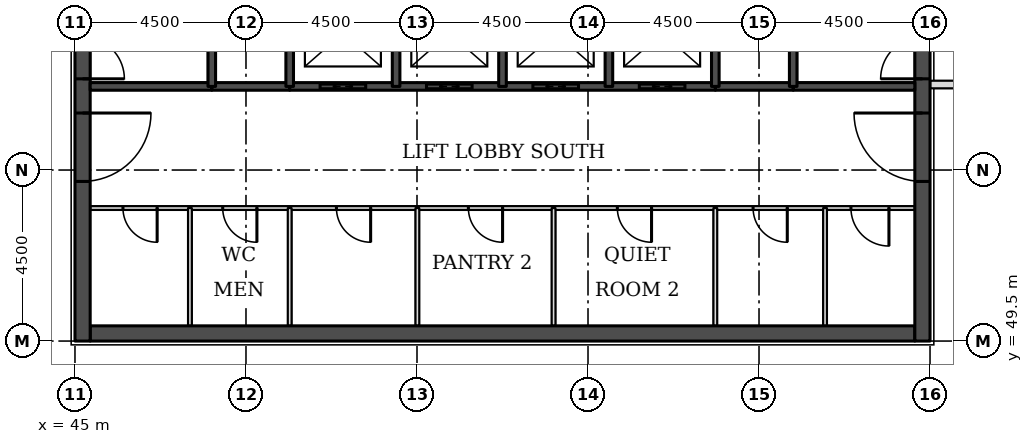
"""IFC4 building model, lengths in metres.
Left out: names, types, materials, properties, quantities, classifications, styles, units other than length and angle.
Written with IfcOpenShell. Run it as: python <this file> out.ifc"""

import sys

from ifc_helpers import new_model, si_unit, direction, frame, frame_2d, origin, place, context, subcontext, project, spatial, rectangle, extrude, element, fill, save


model = new_model("IFC4")
c1 = context("Model", 3, precision=1e-05, world=origin(), true_north=direction((0.0, 1.0)))
c2 = subcontext(c1, "Body", "Model", "MODEL_VIEW")
j1 = project(units=[si_unit("LENGTHUNIT", "METRE"), si_unit("PLANEANGLEUNIT", "RADIAN")], contexts=[c1])
p1 = place(None, origin())
s1 = spatial("IfcSite", under=j1, at=p1, CompositionType="ELEMENT")
p2 = place(p1, origin())
s2 = spatial("IfcBuilding", under=s1, at=p2, CompositionType="ELEMENT")
p3 = place(p2, frame((0.0, 0.0, 206.9)))
s3 = spatial("IfcBuildingStorey", under=s2, at=p3, CompositionType="ELEMENT", Elevation=206.9)
p4 = place(p3, frame((45.4, 49.7, 0.0), z_axis=(0.0, 0.0, 1.0), x_axis=(1.0, 0.0, 0.0)))
e1 = element("IfcWall", 1, at=p4, inside=s3, PredefinedType="SHEAR", context=c2, shape_type="SweptSolid", body=[
    extrude(rectangle(XDim=21.7, YDim=0.4, at=frame_2d((10.85, 0.0))), origin(), (0.0, 0.0, 1.0), 5.0),
])
p5 = place(p3, frame((45.2, 49.5, 0.0), z_axis=(0.0, 0.0, 1.0), x_axis=(0.0, 1.0, 0.0)))
e2 = element("IfcWall", 2, at=p5, inside=s3, PredefinedType="SHEAR", context=c2, shape_type="SweptSolid", body=[
    extrude(rectangle(XDim=22.5, YDim=0.4, at=frame_2d((11.25, 0.0))), origin(), (0.0, 0.0, 1.0), 5.0),
])
p6 = place(p5, frame((4.2, 0.0, 0.0)))
e3 = element("IfcOpeningElement", 3, at=p6, cuts=e2, PredefinedType="OPENING", context=c2, shape_type="SweptSolid", body=[
    extrude(rectangle(XDim=1.8, YDim=2.1, at=frame_2d((0.9, 1.05))), frame((0.0, 0.21, 0.0), z_axis=(0.0, -1.0, 0.0), x_axis=(1.0, 0.0, 0.0)), (0.0, 0.0, 1.0), 0.42),
])
p7 = place(p5, frame((6.9, 0.0, 0.0)))
e4 = element("IfcOpeningElement", 4, at=p7, cuts=e2, PredefinedType="OPENING", context=c2, shape_type="SweptSolid", body=[
    extrude(rectangle(XDim=1.1, YDim=2.1, at=frame_2d((0.55, 1.05))), frame((0.0, 0.21, 0.0), z_axis=(0.0, -1.0, 0.0), x_axis=(1.0, 0.0, 0.0)), (0.0, 0.0, 1.0), 0.42),
])
p8 = place(p5, frame((13.6, 0.0, 0.0)))
e5 = element("IfcOpeningElement", 5, at=p8, cuts=e2, PredefinedType="OPENING", context=c2, shape_type="SweptSolid", body=[
    extrude(rectangle(XDim=1.1, YDim=2.1, at=frame_2d((0.55, 1.05))), frame((0.0, 0.21, 0.0), z_axis=(0.0, -1.0, 0.0), x_axis=(1.0, 0.0, 0.0)), (0.0, 0.0, 1.0), 0.42),
])
p9 = place(p5, frame((16.5, 0.0, 0.0)))
e6 = element("IfcOpeningElement", 6, at=p9, cuts=e2, PredefinedType="OPENING", context=c2, shape_type="SweptSolid", body=[
    extrude(rectangle(XDim=1.8, YDim=2.1, at=frame_2d((0.9, 1.05))), frame((0.0, 0.21, 0.0), z_axis=(0.0, -1.0, 0.0), x_axis=(1.0, 0.0, 0.0)), (0.0, 0.0, 1.0), 0.42),
])
p10 = place(p3, frame((67.3, 49.5, 0.0), z_axis=(0.0, 0.0, 1.0), x_axis=(0.0, 1.0, 0.0)))
e7 = element("IfcWall", 7, at=p10, inside=s3, PredefinedType="SHEAR", context=c2, shape_type="SweptSolid", body=[
    extrude(rectangle(XDim=22.5, YDim=0.4, at=frame_2d((11.25, 0.0))), origin(), (0.0, 0.0, 1.0), 5.0),
])
p11 = place(p10, frame((4.2, 0.0, 0.0)))
e8 = element("IfcOpeningElement", 8, at=p11, cuts=e7, PredefinedType="OPENING", context=c2, shape_type="SweptSolid", body=[
    extrude(rectangle(XDim=1.8, YDim=2.1, at=frame_2d((0.9, 1.05))), frame((0.0, 0.21, 0.0), z_axis=(0.0, -1.0, 0.0), x_axis=(1.0, 0.0, 0.0)), (0.0, 0.0, 1.0), 0.42),
])
p12 = place(p10, frame((6.9, 0.0, 0.0)))
e9 = element("IfcOpeningElement", 9, at=p12, cuts=e7, PredefinedType="OPENING", context=c2, shape_type="SweptSolid", body=[
    extrude(rectangle(XDim=1.1, YDim=2.1, at=frame_2d((0.55, 1.05))), frame((0.0, 0.21, 0.0), z_axis=(0.0, -1.0, 0.0), x_axis=(1.0, 0.0, 0.0)), (0.0, 0.0, 1.0), 0.42),
])
p13 = place(p10, frame((13.6, 0.0, 0.0)))
e10 = element("IfcOpeningElement", 10, at=p13, cuts=e7, PredefinedType="OPENING", context=c2, shape_type="SweptSolid", body=[
    extrude(rectangle(XDim=1.1, YDim=2.1, at=frame_2d((0.55, 1.05))), frame((0.0, 0.21, 0.0), z_axis=(0.0, -1.0, 0.0), x_axis=(1.0, 0.0, 0.0)), (0.0, 0.0, 1.0), 0.42),
])
p14 = place(p10, frame((16.5, 0.0, 0.0)))
e11 = element("IfcOpeningElement", 11, at=p14, cuts=e7, PredefinedType="OPENING", context=c2, shape_type="SweptSolid", body=[
    extrude(rectangle(XDim=1.8, YDim=2.1, at=frame_2d((0.9, 1.05))), frame((0.0, 0.21, 0.0), z_axis=(0.0, -1.0, 0.0), x_axis=(1.0, 0.0, 0.0)), (0.0, 0.0, 1.0), 0.42),
])
p15 = place(p3, frame((67.5, 56.25, 0.0), z_axis=(0.0, 0.0, 1.0), x_axis=(1.0, 0.0, 0.0)))
e12 = element("IfcWall", 12, at=p15, inside=s3, PredefinedType="PARTITIONING", context=c2, shape_type="SweptSolid", body=[
    extrude(rectangle(XDim=2.0, YDim=0.2, at=frame_2d((1.0, 0.0))), origin(), (0.0, 0.0, 1.0), 4.85),
])
p16 = place(p3, frame((45.4, 53.0, 0.0), z_axis=(0.0, 0.0, 1.0), x_axis=(1.0, 0.0, 0.0)))
e13 = element("IfcWall", 13, at=p16, inside=s3, PredefinedType="PARTITIONING", context=c2, shape_type="SweptSolid", body=[
    extrude(rectangle(XDim=21.7, YDim=0.1, at=frame_2d((10.85, 0.0))), origin(), (0.0, 0.0, 1.0), 4.85),
])
p17 = place(p16, frame((20.019, 0.0, 0.0)))
e14 = element("IfcOpeningElement", 14, at=p17, cuts=e13, PredefinedType="OPENING", context=c2, shape_type="SweptSolid", body=[
    extrude(rectangle(XDim=1.0, YDim=2.1, at=frame_2d((0.5, 1.05))), frame((0.0, 0.06, 0.0), z_axis=(0.0, -1.0, 0.0), x_axis=(1.0, 0.0, 0.0)), (0.0, 0.0, 1.0), 0.12),
])
p18 = place(p16, frame((17.444, 0.0, 0.0)))
e15 = element("IfcOpeningElement", 15, at=p18, cuts=e13, PredefinedType="OPENING", context=c2, shape_type="SweptSolid", body=[
    extrude(rectangle(XDim=0.9, YDim=2.1, at=frame_2d((0.45, 1.05))), frame((0.0, 0.06, 0.0), z_axis=(0.0, -1.0, 0.0), x_axis=(1.0, 0.0, 0.0)), (0.0, 0.0, 1.0), 0.12),
])
p19 = place(p16, frame((0.863, 0.0, 0.0)))
e16 = element("IfcOpeningElement", 16, at=p19, cuts=e13, PredefinedType="OPENING", context=c2, shape_type="SweptSolid", body=[
    extrude(rectangle(XDim=0.9, YDim=2.1, at=frame_2d((0.45, 1.05))), frame((0.0, 0.06, 0.0), z_axis=(0.0, -1.0, 0.0), x_axis=(1.0, 0.0, 0.0)), (0.0, 0.0, 1.0), 0.12),
])
p20 = place(p16, frame((3.488, 0.0, 0.0)))
e17 = element("IfcOpeningElement", 17, at=p20, cuts=e13, PredefinedType="OPENING", context=c2, shape_type="SweptSolid", body=[
    extrude(rectangle(XDim=0.9, YDim=2.1, at=frame_2d((0.45, 1.05))), frame((0.0, 0.06, 0.0), z_axis=(0.0, -1.0, 0.0), x_axis=(1.0, 0.0, 0.0)), (0.0, 0.0, 1.0), 0.12),
])
p21 = place(p16, frame((6.48, 0.0, 0.0)))
e18 = element("IfcOpeningElement", 18, at=p21, cuts=e13, PredefinedType="OPENING", context=c2, shape_type="SweptSolid", body=[
    extrude(rectangle(XDim=0.9, YDim=2.1, at=frame_2d((0.45, 1.05))), frame((0.0, 0.06, 0.0), z_axis=(0.0, -1.0, 0.0), x_axis=(1.0, 0.0, 0.0)), (0.0, 0.0, 1.0), 0.12),
])
p22 = place(p16, frame((9.952, 0.0, 0.0)))
e19 = element("IfcOpeningElement", 19, at=p22, cuts=e13, PredefinedType="OPENING", context=c2, shape_type="SweptSolid", body=[
    extrude(rectangle(XDim=0.9, YDim=2.1, at=frame_2d((0.45, 1.05))), frame((0.0, 0.06, 0.0), z_axis=(0.0, -1.0, 0.0), x_axis=(1.0, 0.0, 0.0)), (0.0, 0.0, 1.0), 0.12),
])
p23 = place(p16, frame((13.872, 0.0, 0.0)))
e20 = element("IfcOpeningElement", 20, at=p23, cuts=e13, PredefinedType="OPENING", context=c2, shape_type="SweptSolid", body=[
    extrude(rectangle(XDim=0.9, YDim=2.1, at=frame_2d((0.45, 1.05))), frame((0.0, 0.06, 0.0), z_axis=(0.0, -1.0, 0.0), x_axis=(1.0, 0.0, 0.0)), (0.0, 0.0, 1.0), 0.12),
])
for number, where, z_axis, x_axis in (
    (21, (48.6, 56.2, 0.0), (0.0, 0.0, 1.0), (1.0, 0.0, 0.0)),
    (22, (61.85, 56.2, 0.0), (0.0, 0.0, 1.0), (1.0, 0.0, 0.0)),
):
    element("IfcWall", number, at=place(p3, frame(where, z_axis=z_axis, x_axis=x_axis)), inside=s3, PredefinedType="SOLIDWALL", context=c2, shape_type="SweptSolid", body=[
        extrude(rectangle(XDim=2.05, YDim=0.2, at=frame_2d((1.025, 0.0))), origin(), (0.0, 0.0, 1.0), 4.85),
    ])
p24 = place(p3, frame((45.4, 56.2, 0.0), z_axis=(0.0, 0.0, 1.0), x_axis=(1.0, 0.0, 0.0)))
e23 = element("IfcWall", 23, at=p24, inside=s3, PredefinedType="SOLIDWALL", context=c2, shape_type="SweptSolid", body=[
    extrude(rectangle(XDim=3.2, YDim=0.2, at=frame_2d((1.6, 0.0))), origin(), (0.0, 0.0, 1.0), 4.85),
])
p25 = place(p3, frame((50.65, 56.2, 0.0), z_axis=(0.0, 0.0, 1.0), x_axis=(1.0, 0.0, 0.0)))
e24 = element("IfcWall", 24, at=p25, inside=s3, PredefinedType="SOLIDWALL", context=c2, shape_type="SweptSolid", body=[
    extrude(rectangle(XDim=11.2, YDim=0.2, at=frame_2d((5.6, 0.0))), origin(), (0.0, 0.0, 1.0), 4.85),
])
p26 = place(p25, frame((0.8, 0.0, 0.0)))
e25 = element("IfcOpeningElement", 25, at=p26, cuts=e24, PredefinedType="OPENING", context=c2, shape_type="SweptSolid", body=[
    extrude(rectangle(XDim=1.2, YDim=2.1, at=frame_2d((0.6, 1.05))), frame((0.0, 0.11, 0.0), z_axis=(0.0, -1.0, 0.0), x_axis=(1.0, 0.0, 0.0)), (0.0, 0.0, 1.0), 0.22),
])
p27 = place(p25, frame((3.6, 0.0, 0.0)))
e26 = element("IfcOpeningElement", 26, at=p27, cuts=e24, PredefinedType="OPENING", context=c2, shape_type="SweptSolid", body=[
    extrude(rectangle(XDim=1.2, YDim=2.1, at=frame_2d((0.6, 1.05))), frame((0.0, 0.11, 0.0), z_axis=(0.0, -1.0, 0.0), x_axis=(1.0, 0.0, 0.0)), (0.0, 0.0, 1.0), 0.22),
])
p28 = place(p25, frame((6.4, 0.0, 0.0)))
e27 = element("IfcOpeningElement", 27, at=p28, cuts=e24, PredefinedType="OPENING", context=c2, shape_type="SweptSolid", body=[
    extrude(rectangle(XDim=1.2, YDim=2.1, at=frame_2d((0.6, 1.05))), frame((0.0, 0.11, 0.0), z_axis=(0.0, -1.0, 0.0), x_axis=(1.0, 0.0, 0.0)), (0.0, 0.0, 1.0), 0.22),
])
p29 = place(p25, frame((9.2, 0.0, 0.0)))
e28 = element("IfcOpeningElement", 28, at=p29, cuts=e24, PredefinedType="OPENING", context=c2, shape_type="SweptSolid", body=[
    extrude(rectangle(XDim=1.2, YDim=2.1, at=frame_2d((0.6, 1.05))), frame((0.0, 0.11, 0.0), z_axis=(0.0, -1.0, 0.0), x_axis=(1.0, 0.0, 0.0)), (0.0, 0.0, 1.0), 0.22),
])
p30 = place(p3, frame((63.9, 56.2, 0.0), z_axis=(0.0, 0.0, 1.0), x_axis=(1.0, 0.0, 0.0)))
e29 = element("IfcWall", 29, at=p30, inside=s3, PredefinedType="SOLIDWALL", context=c2, shape_type="SweptSolid", body=[
    extrude(rectangle(XDim=3.2, YDim=0.2, at=frame_2d((1.6, 0.0))), origin(), (0.0, 0.0, 1.0), 4.85),
])
p31 = place(p3, frame((48.025, 49.9, 0.0), z_axis=(0.0, 0.0, 1.0), x_axis=(0.0, 1.0, 0.0)))
e30 = element("IfcWall", 30, at=p31, inside=s3, PredefinedType="PARTITIONING", context=c2, shape_type="SweptSolid", body=[
    extrude(rectangle(XDim=3.1, YDim=0.1, at=frame_2d((1.55, 0.0))), origin(), (0.0, 0.0, 1.0), 4.85),
])
p32 = place(p3, frame((48.6, 56.2, 0.0), z_axis=(0.0, 0.0, 1.0), x_axis=(0.0, 1.0, 0.0)))
e31 = element("IfcWall", 31, at=p32, inside=s3, PredefinedType="SOLIDWALL", context=c2, shape_type="SweptSolid", body=[
    extrude(rectangle(XDim=5.8, YDim=0.2, at=frame_2d((2.9, 0.0))), origin(), (0.0, 0.0, 1.0), 4.85),
])
p33 = place(p3, frame((50.65, 49.9, 0.0), z_axis=(0.0, 0.0, 1.0), x_axis=(0.0, 1.0, 0.0)))
e32 = element("IfcWall", 32, at=p33, inside=s3, PredefinedType="PARTITIONING", context=c2, shape_type="SweptSolid", body=[
    extrude(rectangle(XDim=3.1, YDim=0.1, at=frame_2d((1.55, 0.0))), origin(), (0.0, 0.0, 1.0), 4.85),
])
for number, where, z_axis, x_axis in (
    (33, (50.65, 56.2, 0.0), (0.0, 0.0, 1.0), (0.0, 1.0, 0.0)),
    (34, (53.45, 56.2, 0.0), (0.0, 0.0, 1.0), (0.0, 1.0, 0.0)),
):
    element("IfcWall", number, at=place(p3, frame(where, z_axis=z_axis, x_axis=x_axis)), inside=s3, PredefinedType="SOLIDWALL", context=c2, shape_type="SweptSolid", body=[
        extrude(rectangle(XDim=2.8, YDim=0.2, at=frame_2d((1.4, 0.0))), origin(), (0.0, 0.0, 1.0), 4.85),
    ])
p34 = place(p3, frame((54.01, 49.9, 0.0), z_axis=(0.0, 0.0, 1.0), x_axis=(0.0, 1.0, 0.0)))
e35 = element("IfcWall", 35, at=p34, inside=s3, PredefinedType="PARTITIONING", context=c2, shape_type="SweptSolid", body=[
    extrude(rectangle(XDim=3.1, YDim=0.1, at=frame_2d((1.55, 0.0))), origin(), (0.0, 0.0, 1.0), 4.85),
])
p35 = place(p3, frame((56.25, 56.2, 0.0), z_axis=(0.0, 0.0, 1.0), x_axis=(0.0, 1.0, 0.0)))
e36 = element("IfcWall", 36, at=p35, inside=s3, PredefinedType="SOLIDWALL", context=c2, shape_type="SweptSolid", body=[
    extrude(rectangle(XDim=2.8, YDim=0.2, at=frame_2d((1.4, 0.0))), origin(), (0.0, 0.0, 1.0), 4.85),
])
p36 = place(p3, frame((57.594, 49.9, 0.0), z_axis=(0.0, 0.0, 1.0), x_axis=(0.0, 1.0, 0.0)))
e37 = element("IfcWall", 37, at=p36, inside=s3, PredefinedType="PARTITIONING", context=c2, shape_type="SweptSolid", body=[
    extrude(rectangle(XDim=3.1, YDim=0.1, at=frame_2d((1.55, 0.0))), origin(), (0.0, 0.0, 1.0), 4.85),
])
p37 = place(p3, frame((59.05, 56.2, 0.0), z_axis=(0.0, 0.0, 1.0), x_axis=(0.0, 1.0, 0.0)))
e38 = element("IfcWall", 38, at=p37, inside=s3, PredefinedType="SOLIDWALL", context=c2, shape_type="SweptSolid", body=[
    extrude(rectangle(XDim=2.8, YDim=0.2, at=frame_2d((1.4, 0.0))), origin(), (0.0, 0.0, 1.0), 4.85),
])
p38 = place(p3, frame((61.85, 49.9, 0.0), z_axis=(0.0, 0.0, 1.0), x_axis=(0.0, 1.0, 0.0)))
e39 = element("IfcWall", 39, at=p38, inside=s3, PredefinedType="PARTITIONING", context=c2, shape_type="SweptSolid", body=[
    extrude(rectangle(XDim=3.1, YDim=0.1, at=frame_2d((1.55, 0.0))), origin(), (0.0, 0.0, 1.0), 4.85),
])
p39 = place(p3, frame((61.85, 56.2, 0.0), z_axis=(0.0, 0.0, 1.0), x_axis=(0.0, 1.0, 0.0)))
e40 = element("IfcWall", 40, at=p39, inside=s3, PredefinedType="SOLIDWALL", context=c2, shape_type="SweptSolid", body=[
    extrude(rectangle(XDim=2.8, YDim=0.2, at=frame_2d((1.4, 0.0))), origin(), (0.0, 0.0, 1.0), 4.85),
])
p40 = place(p3, frame((63.9, 56.2, 0.0), z_axis=(0.0, 0.0, 1.0), x_axis=(0.0, 1.0, 0.0)))
e41 = element("IfcWall", 41, at=p40, inside=s3, PredefinedType="SOLIDWALL", context=c2, shape_type="SweptSolid", body=[
    extrude(rectangle(XDim=5.8, YDim=0.2, at=frame_2d((2.9, 0.0))), origin(), (0.0, 0.0, 1.0), 4.85),
])
p41 = place(p3, frame((64.738, 49.9, 0.0), z_axis=(0.0, 0.0, 1.0), x_axis=(0.0, 1.0, 0.0)))
e42 = element("IfcWall", 42, at=p41, inside=s3, PredefinedType="PARTITIONING", context=c2, shape_type="SweptSolid", body=[
    extrude(rectangle(XDim=3.1, YDim=0.1, at=frame_2d((1.55, 0.0))), origin(), (0.0, 0.0, 1.0), 4.85),
])
p42 = place(p26, origin())
e43 = element("IfcDoor", 43, at=p42, inside=s3, OperationType="DOUBLE_DOOR_SLIDING", PredefinedType="DOOR", context=c2, shape_type="SweptSolid", body=[
    extrude(rectangle(XDim=1.2, YDim=2.1, at=frame_2d((0.6, 1.05))), frame((0.0, 0.025, 0.0), z_axis=(0.0, -1.0, 0.0), x_axis=(1.0, 0.0, 0.0)), (0.0, 0.0, 1.0), 0.05),
])
fill(e25, e43)
p43 = place(p27, origin())
e44 = element("IfcDoor", 44, at=p43, inside=s3, OperationType="DOUBLE_DOOR_SLIDING", PredefinedType="DOOR", context=c2, shape_type="SweptSolid", body=[
    extrude(rectangle(XDim=1.2, YDim=2.1, at=frame_2d((0.6, 1.05))), frame((0.0, 0.025, 0.0), z_axis=(0.0, -1.0, 0.0), x_axis=(1.0, 0.0, 0.0)), (0.0, 0.0, 1.0), 0.05),
])
fill(e26, e44)
p44 = place(p28, origin())
e45 = element("IfcDoor", 45, at=p44, inside=s3, OperationType="DOUBLE_DOOR_SLIDING", PredefinedType="DOOR", context=c2, shape_type="SweptSolid", body=[
    extrude(rectangle(XDim=1.2, YDim=2.1, at=frame_2d((0.6, 1.05))), frame((0.0, 0.025, 0.0), z_axis=(0.0, -1.0, 0.0), x_axis=(1.0, 0.0, 0.0)), (0.0, 0.0, 1.0), 0.05),
])
fill(e27, e45)
p45 = place(p29, origin())
e46 = element("IfcDoor", 46, at=p45, inside=s3, OperationType="DOUBLE_DOOR_SLIDING", PredefinedType="DOOR", context=c2, shape_type="SweptSolid", body=[
    extrude(rectangle(XDim=1.2, YDim=2.1, at=frame_2d((0.6, 1.05))), frame((0.0, 0.025, 0.0), z_axis=(0.0, -1.0, 0.0), x_axis=(1.0, 0.0, 0.0)), (0.0, 0.0, 1.0), 0.05),
])
fill(e28, e46)
p46 = place(p6, frame((1.8, 0.0, 0.0), z_axis=(0.0, 0.0, 1.0), x_axis=(-1.0, 0.0, 0.0)))
e47 = element("IfcDoor", 47, at=p46, inside=s3, OperationType="SINGLE_SWING_LEFT", PredefinedType="DOOR", context=c2, shape_type="SweptSolid", body=[
    extrude(rectangle(XDim=1.8, YDim=2.1, at=frame_2d((0.9, 1.05))), frame((0.0, 0.025, 0.0), z_axis=(0.0, -1.0, 0.0), x_axis=(1.0, 0.0, 0.0)), (0.0, 0.0, 1.0), 0.05),
])
fill(e3, e47)
p47 = place(p7, frame((1.1, 0.0, 0.0), z_axis=(0.0, 0.0, 1.0), x_axis=(-1.0, 0.0, 0.0)))
e48 = element("IfcDoor", 48, at=p47, inside=s3, OperationType="SINGLE_SWING_RIGHT", PredefinedType="DOOR", context=c2, shape_type="SweptSolid", body=[
    extrude(rectangle(XDim=1.1, YDim=2.1, at=frame_2d((0.55, 1.05))), frame((0.0, 0.025, 0.0), z_axis=(0.0, -1.0, 0.0), x_axis=(1.0, 0.0, 0.0)), (0.0, 0.0, 1.0), 0.05),
])
fill(e4, e48)
p48 = place(p11, origin())
e49 = element("IfcDoor", 49, at=p48, inside=s3, OperationType="SINGLE_SWING_RIGHT", PredefinedType="DOOR", context=c2, shape_type="SweptSolid", body=[
    extrude(rectangle(XDim=1.8, YDim=2.1, at=frame_2d((0.9, 1.05))), frame((0.0, 0.025, 0.0), z_axis=(0.0, -1.0, 0.0), x_axis=(1.0, 0.0, 0.0)), (0.0, 0.0, 1.0), 0.05),
])
fill(e8, e49)
p49 = place(p12, origin())
e50 = element("IfcDoor", 50, at=p49, inside=s3, OperationType="SINGLE_SWING_LEFT", PredefinedType="DOOR", context=c2, shape_type="SweptSolid", body=[
    extrude(rectangle(XDim=1.1, YDim=2.1, at=frame_2d((0.55, 1.05))), frame((0.0, 0.025, 0.0), z_axis=(0.0, -1.0, 0.0), x_axis=(1.0, 0.0, 0.0)), (0.0, 0.0, 1.0), 0.05),
])
fill(e9, e50)
p50 = place(p17, frame((1.0, 0.0, 0.0), z_axis=(0.0, 0.0, 1.0), x_axis=(-1.0, 0.0, 0.0)))
e51 = element("IfcDoor", 51, at=p50, inside=s3, OperationType="SINGLE_SWING_LEFT", PredefinedType="DOOR", context=c2, shape_type="SweptSolid", body=[
    extrude(rectangle(XDim=1.0, YDim=2.1, at=frame_2d((0.5, 1.05))), frame((0.0, 0.025, 0.0), z_axis=(0.0, -1.0, 0.0), x_axis=(1.0, 0.0, 0.0)), (0.0, 0.0, 1.0), 0.05),
])
fill(e14, e51)
p51 = place(p18, frame((0.9, 0.0, 0.0), z_axis=(0.0, 0.0, 1.0), x_axis=(-1.0, 0.0, 0.0)))
e52 = element("IfcDoor", 52, at=p51, inside=s3, OperationType="SINGLE_SWING_LEFT", PredefinedType="DOOR", context=c2, shape_type="SweptSolid", body=[
    extrude(rectangle(XDim=0.9, YDim=2.1, at=frame_2d((0.45, 1.05))), frame((0.0, 0.025, 0.0), z_axis=(0.0, -1.0, 0.0), x_axis=(1.0, 0.0, 0.0)), (0.0, 0.0, 1.0), 0.05),
])
fill(e15, e52)
p52 = place(p19, frame((0.9, 0.0, 0.0), z_axis=(0.0, 0.0, 1.0), x_axis=(-1.0, 0.0, 0.0)))
e53 = element("IfcDoor", 53, at=p52, inside=s3, OperationType="SINGLE_SWING_LEFT", PredefinedType="DOOR", context=c2, shape_type="SweptSolid", body=[
    extrude(rectangle(XDim=0.9, YDim=2.1, at=frame_2d((0.45, 1.05))), frame((0.0, 0.025, 0.0), z_axis=(0.0, -1.0, 0.0), x_axis=(1.0, 0.0, 0.0)), (0.0, 0.0, 1.0), 0.05),
])
fill(e16, e53)
p53 = place(p20, frame((0.9, 0.0, 0.0), z_axis=(0.0, 0.0, 1.0), x_axis=(-1.0, 0.0, 0.0)))
e54 = element("IfcDoor", 54, at=p53, inside=s3, OperationType="SINGLE_SWING_LEFT", PredefinedType="DOOR", context=c2, shape_type="SweptSolid", body=[
    extrude(rectangle(XDim=0.9, YDim=2.1, at=frame_2d((0.45, 1.05))), frame((0.0, 0.025, 0.0), z_axis=(0.0, -1.0, 0.0), x_axis=(1.0, 0.0, 0.0)), (0.0, 0.0, 1.0), 0.05),
])
fill(e17, e54)
p54 = place(p21, frame((0.9, 0.0, 0.0), z_axis=(0.0, 0.0, 1.0), x_axis=(-1.0, 0.0, 0.0)))
e55 = element("IfcDoor", 55, at=p54, inside=s3, OperationType="SINGLE_SWING_LEFT", PredefinedType="DOOR", context=c2, shape_type="SweptSolid", body=[
    extrude(rectangle(XDim=0.9, YDim=2.1, at=frame_2d((0.45, 1.05))), frame((0.0, 0.025, 0.0), z_axis=(0.0, -1.0, 0.0), x_axis=(1.0, 0.0, 0.0)), (0.0, 0.0, 1.0), 0.05),
])
fill(e18, e55)
p55 = place(p22, frame((0.9, 0.0, 0.0), z_axis=(0.0, 0.0, 1.0), x_axis=(-1.0, 0.0, 0.0)))
e56 = element("IfcDoor", 56, at=p55, inside=s3, OperationType="SINGLE_SWING_LEFT", PredefinedType="DOOR", context=c2, shape_type="SweptSolid", body=[
    extrude(rectangle(XDim=0.9, YDim=2.1, at=frame_2d((0.45, 1.05))), frame((0.0, 0.025, 0.0), z_axis=(0.0, -1.0, 0.0), x_axis=(1.0, 0.0, 0.0)), (0.0, 0.0, 1.0), 0.05),
])
fill(e19, e56)
p56 = place(p23, frame((0.9, 0.0, 0.0), z_axis=(0.0, 0.0, 1.0), x_axis=(-1.0, 0.0, 0.0)))
e57 = element("IfcDoor", 57, at=p56, inside=s3, OperationType="SINGLE_SWING_LEFT", PredefinedType="DOOR", context=c2, shape_type="SweptSolid", body=[
    extrude(rectangle(XDim=0.9, YDim=2.1, at=frame_2d((0.45, 1.05))), frame((0.0, 0.025, 0.0), z_axis=(0.0, -1.0, 0.0), x_axis=(1.0, 0.0, 0.0)), (0.0, 0.0, 1.0), 0.05),
])
fill(e20, e57)
save(model, sys.argv[1])
